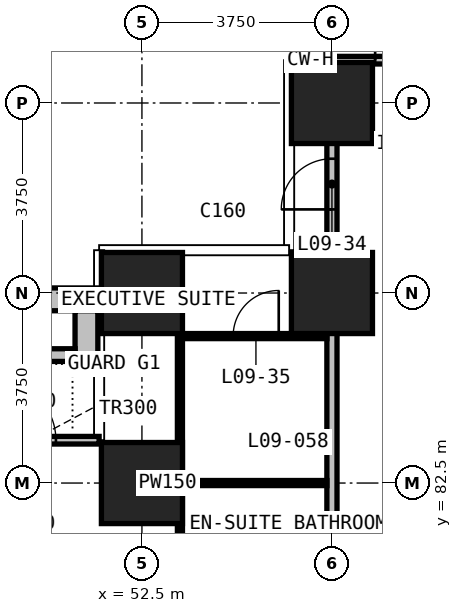
"""IFC4 building model, lengths in metres.
Left out: names, types, materials, properties, quantities, classifications, styles, units other than length and angle.
Written with IfcOpenShell. Run it as: python <this file> out.ifc"""

import sys

from ifc_helpers import new_model, si_unit, direction, frame, frame_2d, origin, origin_2d, place, context, subcontext, project, spatial, rectangle, extrude, element, fill, save


model = new_model("IFC4")
c1 = context("Model", 3, precision=1e-05, world=origin(), true_north=direction((0.0, 1.0)))
c2 = subcontext(c1, "Body", "Model", "MODEL_VIEW")
j1 = project(units=[si_unit("LENGTHUNIT", "METRE"), si_unit("PLANEANGLEUNIT", "RADIAN")], contexts=[c1])
p1 = place(None, origin())
s1 = spatial("IfcSite", under=j1, at=p1, CompositionType="ELEMENT")
p2 = place(p1, origin())
s2 = spatial("IfcBuilding", under=s1, at=p2, CompositionType="ELEMENT")
p3 = place(p2, frame((0.0, 0.0, 49.4)))
s3 = spatial("IfcBuildingStorey", under=s2, at=p3, CompositionType="ELEMENT", Elevation=49.4)
for number, where, z_axis, x_axis in (
    (1, (52.5, 82.5, 0.0), (0.0, 0.0, 1.0), (1.0, 0.0, 0.0)),
    (2, (52.5, 86.25, 0.0), (0.0, 0.0, 1.0), (1.0, 0.0, 0.0)),
    (3, (56.25, 86.25, 0.0), (0.0, 0.0, 1.0), (1.0, 0.0, 0.0)),
    (4, (56.25, 90.0, 0.0), (0.0, 0.0, 1.0), (1.0, 0.0, 0.0)),
):
    element("IfcColumn", number, at=place(p3, frame(where, z_axis=z_axis, x_axis=x_axis)), inside=s3, PredefinedType="COLUMN", context=c2, shape_type="SweptSolid", body=[
        extrude(rectangle(XDim=1.6, YDim=1.6, at=origin_2d()), origin(), (0.0, 0.0, 1.0), 3.3),
    ])
p4 = place(p3, frame((56.25, 90.845, 0.0), z_axis=(0.0, 0.0, 1.0), x_axis=(1.0, 0.0, 0.0)))
e5 = element("IfcWall", 5, at=p4, inside=s3, PredefinedType="SOLIDWALL", context=c2, shape_type="SweptSolid", body=[
    extrude(rectangle(XDim=2.905, YDim=0.15, at=frame_2d((1.453, 0.0))), origin(), (0.0, 0.0, 1.0), 3.0),
])
p5 = place(p4, frame((0.853, 0.0, 0.0)))
e6 = element("IfcOpeningElement", 6, at=p5, cuts=e5, PredefinedType="OPENING", context=c2, shape_type="SweptSolid", body=[
    extrude(rectangle(XDim=1.2, YDim=2.4, at=frame_2d((0.6, 1.2))), frame((0.0, 0.085, 0.0), z_axis=(0.0, -1.0, 0.0), x_axis=(1.0, 0.0, 0.0)), (0.0, 0.0, 1.0), 0.17),
])
p6 = place(p3, frame((48.75, 83.345, 0.0), z_axis=(0.0, 0.0, 1.0), x_axis=(1.0, 0.0, 0.0)))
e7 = element("IfcWall", 7, at=p6, inside=s3, PredefinedType="SOLIDWALL", context=c2, shape_type="SweptSolid", body=[
    extrude(rectangle(XDim=2.905, YDim=0.15, at=frame_2d((1.453, 0.0))), origin(), (0.0, 0.0, 1.0), 3.0),
])
p7 = place(p6, frame((0.853, 0.0, 0.0)))
e8 = element("IfcOpeningElement", 8, at=p7, cuts=e7, PredefinedType="OPENING", context=c2, shape_type="SweptSolid", body=[
    extrude(rectangle(XDim=1.2, YDim=2.0, at=frame_2d((0.6, 1.0))), frame((0.0, 0.085, 0.0), z_axis=(0.0, -1.0, 0.0), x_axis=(1.0, 0.0, 0.0)), (0.0, 0.0, 1.0), 0.17),
])
p8 = place(p3, frame((48.45, 86.125, 0.0), z_axis=(0.0, 0.0, 1.0), x_axis=(1.0, 0.0, 0.0)))
e9 = element("IfcWall", 9, at=p8, inside=s3, PredefinedType="USERDEFINED", context=c2, shape_type="SweptSolid", body=[
    extrude(rectangle(XDim=3.18, YDim=0.45, at=frame_2d((1.59, 0.0))), origin(), (0.0, 0.0, 1.0), 1.1),
])
p9 = place(p3, frame((51.405, 84.9, 0.0), z_axis=(0.0, 0.0, 1.0), x_axis=(0.0, 1.0, 0.0)))
e10 = element("IfcWall", 10, at=p9, inside=s3, PredefinedType="USERDEFINED", context=c2, shape_type="SweptSolid", body=[
    extrude(rectangle(XDim=1.0, YDim=0.45, at=frame_2d((0.5, 0.0))), origin(), (0.0, 0.0, 1.0), 1.1),
])
p10 = place(p3, frame((48.9, 85.025, 0.0), z_axis=(0.0, 0.0, 1.0), x_axis=(1.0, 0.0, 0.0)))
e11 = element("IfcWall", 11, at=p10, inside=s3, PredefinedType="USERDEFINED", context=c2, shape_type="SweptSolid", body=[
    extrude(rectangle(XDim=2.28, YDim=0.25, at=frame_2d((1.14, 0.0))), origin(), (0.0, 0.0, 1.0), 1.0),
])
p11 = place(p3, frame((56.25, 52.4, 0.0), z_axis=(0.0, 0.0, 1.0), x_axis=(0.0, 1.0, 0.0)))
e12 = element("IfcWall", 12, at=p11, inside=s3, PredefinedType="PARTITIONING", context=c2, shape_type="SweptSolid", body=[
    extrude(rectangle(XDim=37.675, YDim=0.2, at=frame_2d((18.837, 0.0))), origin(), (0.0, 0.0, 1.0), 3.0),
])
p12 = place(p11, frame((5.5, 0.0, 0.0)))
e13 = element("IfcOpeningElement", 13, at=p12, cuts=e12, PredefinedType="OPENING", context=c2, shape_type="SweptSolid", body=[
    extrude(rectangle(XDim=1.0, YDim=2.2, at=frame_2d((0.5, 1.1))), frame((0.0, 0.11, 0.0), z_axis=(0.0, -1.0, 0.0), x_axis=(1.0, 0.0, 0.0)), (0.0, 0.0, 1.0), 0.22),
])
p13 = place(p11, frame((8.7, 0.0, 0.0)))
e14 = element("IfcOpeningElement", 14, at=p13, cuts=e12, PredefinedType="OPENING", context=c2, shape_type="SweptSolid", body=[
    extrude(rectangle(XDim=1.0, YDim=2.2, at=frame_2d((0.5, 1.1))), frame((0.0, 0.11, 0.0), z_axis=(0.0, -1.0, 0.0), x_axis=(1.0, 0.0, 0.0)), (0.0, 0.0, 1.0), 0.22),
])
p14 = place(p11, frame((20.5, 0.0, 0.0)))
e15 = element("IfcOpeningElement", 15, at=p14, cuts=e12, PredefinedType="OPENING", context=c2, shape_type="SweptSolid", body=[
    extrude(rectangle(XDim=1.0, YDim=2.2, at=frame_2d((0.5, 1.1))), frame((0.0, 0.11, 0.0), z_axis=(0.0, -1.0, 0.0), x_axis=(1.0, 0.0, 0.0)), (0.0, 0.0, 1.0), 0.22),
])
p15 = place(p11, frame((23.7, 0.0, 0.0)))
e16 = element("IfcOpeningElement", 16, at=p15, cuts=e12, PredefinedType="OPENING", context=c2, shape_type="SweptSolid", body=[
    extrude(rectangle(XDim=1.0, YDim=2.2, at=frame_2d((0.5, 1.1))), frame((0.0, 0.11, 0.0), z_axis=(0.0, -1.0, 0.0), x_axis=(1.0, 0.0, 0.0)), (0.0, 0.0, 1.0), 0.22),
])
p16 = place(p11, frame((35.5, 0.0, 0.0)))
e17 = element("IfcOpeningElement", 17, at=p16, cuts=e12, PredefinedType="OPENING", context=c2, shape_type="SweptSolid", body=[
    extrude(rectangle(XDim=1.0, YDim=2.2, at=frame_2d((0.5, 1.1))), frame((0.0, 0.11, 0.0), z_axis=(0.0, -1.0, 0.0), x_axis=(1.0, 0.0, 0.0)), (0.0, 0.0, 1.0), 0.22),
])
p17 = place(p3, frame((56.25, 90.03, 0.0), z_axis=(0.0, 0.0, 1.0), x_axis=(0.0, 1.0, 0.0)))
e18 = element("IfcWall", 18, at=p17, inside=s3, PredefinedType="PARTITIONING", context=c2, shape_type="SweptSolid", body=[
    extrude(rectangle(XDim=0.615, YDim=0.2, at=frame_2d((0.308, 0.0))), origin(), (0.0, 0.0, 1.0), 3.0),
])
p18 = place(p3, frame((52.81, 82.5, 0.0), z_axis=(0.0, 0.0, 1.0), x_axis=(1.0, 0.0, 0.0)))
e19 = element("IfcWall", 19, at=p18, inside=s3, PredefinedType="PARTITIONING", context=c2, shape_type="SweptSolid", body=[
    extrude(rectangle(XDim=0.39, YDim=0.15, at=frame_2d((0.195, 0.0))), origin(), (0.0, 0.0, 1.0), 3.0),
])
p19 = place(p3, frame((55.605, 90.0, 0.0), z_axis=(0.0, 0.0, 1.0), x_axis=(1.0, 0.0, 0.0)))
e20 = element("IfcWall", 20, at=p19, inside=s3, PredefinedType="PARTITIONING", context=c2, shape_type="SweptSolid", body=[
    extrude(rectangle(XDim=0.545, YDim=0.15, at=frame_2d((0.272, 0.0))), origin(), (0.0, 0.0, 1.0), 3.0),
])
p20 = place(p3, frame((52.735, 82.425, 0.0), z_axis=(0.0, 0.0, 1.0), x_axis=(0.0, 1.0, 0.0)))
e21 = element("IfcWall", 21, at=p20, inside=s3, PredefinedType="PARTITIONING", context=c2, shape_type="SweptSolid", body=[
    extrude(rectangle(XDim=0.84, YDim=0.15, at=frame_2d((0.42, 0.0))), origin(), (0.0, 0.0, 1.0), 3.0),
])
p21 = place(p3, frame((53.3, 82.5, 0.0), z_axis=(0.0, 0.0, 1.0), x_axis=(1.0, 0.0, 0.0)))
e22 = element("IfcWall", 22, at=p21, inside=s3, PredefinedType="PARTITIONING", context=c2, shape_type="SweptSolid", body=[
    extrude(rectangle(XDim=2.85, YDim=0.1, at=frame_2d((1.425, 0.0))), origin(), (0.0, 0.0, 1.0), 3.0),
])
p22 = place(p3, frame((53.3, 85.4, 0.0), z_axis=(0.0, 0.0, 1.0), x_axis=(1.0, 0.0, 0.0)))
e23 = element("IfcWall", 23, at=p22, inside=s3, PredefinedType="PARTITIONING", context=c2, shape_type="SweptSolid", body=[
    extrude(rectangle(XDim=2.85, YDim=0.1, at=frame_2d((1.425, 0.0))), origin(), (0.0, 0.0, 1.0), 3.0),
])
p23 = place(p22, frame((1.0, 0.0, 0.0)))
e24 = element("IfcOpeningElement", 24, at=p23, cuts=e23, PredefinedType="OPENING", context=c2, shape_type="SweptSolid", body=[
    extrude(rectangle(XDim=0.9, YDim=2.2, at=frame_2d((0.45, 1.1))), frame((0.0, 0.06, 0.0), z_axis=(0.0, -1.0, 0.0), x_axis=(1.0, 0.0, 0.0)), (0.0, 0.0, 1.0), 0.12),
])
p24 = place(p3, frame((53.25, 79.55, 0.0), z_axis=(0.0, 0.0, 1.0), x_axis=(0.0, 1.0, 0.0)))
e25 = element("IfcWall", 25, at=p24, inside=s3, PredefinedType="PARTITIONING", context=c2, shape_type="SweptSolid", body=[
    extrude(rectangle(XDim=5.9, YDim=0.1, at=frame_2d((2.95, 0.0))), origin(), (0.0, 0.0, 1.0), 3.0),
])
p25 = place(p5, origin())
e26 = element("IfcDoor", 26, at=p25, inside=s3, OperationType="SINGLE_SWING_LEFT", PredefinedType="DOOR", context=c2, shape_type="SweptSolid", body=[
    extrude(rectangle(XDim=1.2, YDim=2.4, at=frame_2d((0.6, 1.2))), frame((0.0, 0.025, 0.0), z_axis=(0.0, -1.0, 0.0), x_axis=(1.0, 0.0, 0.0)), (0.0, 0.0, 1.0), 0.05),
])
fill(e6, e26)
p26 = place(p7, origin())
e27 = element("IfcDoor", 27, at=p26, inside=s3, OperationType="SINGLE_SWING_LEFT", PredefinedType="DOOR", context=c2, shape_type="SweptSolid", body=[
    extrude(rectangle(XDim=1.2, YDim=2.0, at=frame_2d((0.6, 1.0))), frame((0.0, 0.025, 0.0), z_axis=(0.0, -1.0, 0.0), x_axis=(1.0, 0.0, 0.0)), (0.0, 0.0, 1.0), 0.05),
])
fill(e8, e27)
p27 = place(p16, origin())
e28 = element("IfcDoor", 28, at=p27, inside=s3, OperationType="SINGLE_SWING_RIGHT", PredefinedType="DOOR", context=c2, shape_type="SweptSolid", body=[
    extrude(rectangle(XDim=1.0, YDim=2.2, at=frame_2d((0.5, 1.1))), frame((0.0, 0.025, 0.0), z_axis=(0.0, -1.0, 0.0), x_axis=(1.0, 0.0, 0.0)), (0.0, 0.0, 1.0), 0.05),
])
fill(e17, e28)
p28 = place(p23, origin())
e29 = element("IfcDoor", 29, at=p28, inside=s3, OperationType="SINGLE_SWING_RIGHT", PredefinedType="DOOR", context=c2, shape_type="SweptSolid", body=[
    extrude(rectangle(XDim=0.9, YDim=2.2, at=frame_2d((0.45, 1.1))), frame((0.0, 0.025, 0.0), z_axis=(0.0, -1.0, 0.0), x_axis=(1.0, 0.0, 0.0)), (0.0, 0.0, 1.0), 0.05),
])
fill(e24, e29)
save(model, sys.argv[1])
